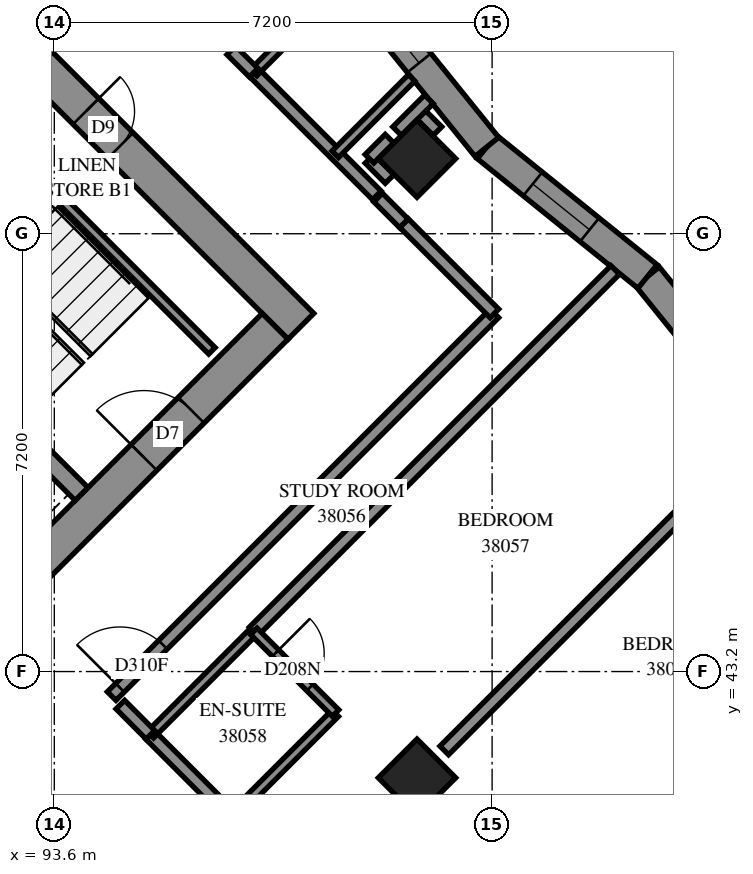
"""IFC4 building model, lengths in metres.
Left out: names, types, materials, properties, quantities, classifications, styles, units other than length and angle.
Written with IfcOpenShell. Run it as: python <this file> out.ifc"""

import sys

from ifc_helpers import new_model, si_unit, direction, frame, frame_2d, origin, origin_2d, place, context, subcontext, project, spatial, polyline, rectangle, outline, extrude, element, fill, save


model = new_model("IFC4")
c1 = context("Model", 3, precision=1e-05, world=origin(), true_north=direction((0.0, 1.0)))
c2 = subcontext(c1, "Body", "Model", "MODEL_VIEW")
j1 = project(units=[si_unit("LENGTHUNIT", "METRE"), si_unit("PLANEANGLEUNIT", "RADIAN")], contexts=[c1])
p1 = place(None, origin())
s1 = spatial("IfcSite", under=j1, at=p1, CompositionType="ELEMENT")
p2 = place(p1, origin())
s2 = spatial("IfcBuilding", under=s1, at=p2, CompositionType="ELEMENT")
p3 = place(p2, frame((0.0, 0.0, 142.2)))
s3 = spatial("IfcBuildingStorey", under=s2, at=p3, CompositionType="ELEMENT", Elevation=142.2)
for number, where, z_axis, x_axis in (
    (1, (99.565, 51.635, 0.0), (0.0, 0.0, 1.0), (0.707, -0.707, 0.0)),
    (2, (99.565, 41.453, 0.0), (0.0, 0.0, 1.0), (0.707, -0.707, 0.0)),
):
    element("IfcColumn", number, at=place(p3, frame(where, z_axis=z_axis, x_axis=x_axis)), inside=s3, PredefinedType="COLUMN", context=c2, shape_type="SweptSolid", body=[
        extrude(rectangle(XDim=0.9, YDim=0.9, at=origin_2d()), origin(), (0.0, 0.0, 1.0), 3.1),
    ])
p4 = place(p3, frame((86.625, 59.908, -0.3), z_axis=(0.0, 0.0, 1.0), x_axis=(0.7071067812, -0.7071067812, 0.0)))
e3 = element("IfcWall", 3, at=p4, inside=s3, PredefinedType="SHEAR", context=c2, shape_type="SweptSolid", body=[
    extrude(rectangle(XDim=15.6, YDim=0.6, at=frame_2d((7.8, 0.0))), origin(), (0.0, 0.0, 1.0), 2.7),
])
p5 = place(p4, frame((10.6, 0.0, 0.3)))
e4 = element("IfcOpeningElement", 4, at=p5, cuts=e3, PredefinedType="OPENING", context=c2, shape_type="SweptSolid", body=[
    extrude(rectangle(XDim=0.8, YDim=2.1, at=frame_2d((0.4, 1.05))), frame((0.0, 0.31, 0.0), z_axis=(0.0, -1.0, 0.0), x_axis=(1.0, 0.0, 0.0)), (0.0, 0.0, 1.0), 0.62),
])
p6 = place(p3, frame((87.049, 38.695, -0.3), z_axis=(0.0, 0.0, 1.0), x_axis=(0.7071067812, 0.7071067812, 0.0)))
e5 = element("IfcWall", 5, at=p6, inside=s3, PredefinedType="SHEAR", context=c2, shape_type="SweptSolid", body=[
    extrude(rectangle(XDim=14.4, YDim=0.6, at=frame_2d((7.2, 0.0))), origin(), (0.0, 0.0, 1.0), 2.7),
])
p7 = place(p6, frame((4.55, 0.0, 0.3)))
e6 = element("IfcOpeningElement", 6, at=p7, cuts=e5, PredefinedType="OPENING", context=c2, shape_type="SweptSolid", body=[
    extrude(rectangle(XDim=1.1, YDim=2.1, at=frame_2d((0.55, 1.05))), frame((0.0, 0.31, 0.0), z_axis=(0.0, -1.0, 0.0), x_axis=(1.0, 0.0, 0.0)), (0.0, 0.0, 1.0), 0.62),
])
p8 = place(p6, frame((11.35, 0.0, 0.3)))
e7 = element("IfcOpeningElement", 7, at=p8, cuts=e5, PredefinedType="OPENING", context=c2, shape_type="SweptSolid", body=[
    extrude(rectangle(XDim=1.1, YDim=2.1, at=frame_2d((0.55, 1.05))), frame((0.0, 0.31, 0.0), z_axis=(0.0, -1.0, 0.0), x_axis=(1.0, 0.0, 0.0)), (0.0, 0.0, 1.0), 0.62),
])
p9 = place(p3, frame((88.958, 51.211, 0.0), z_axis=(0.0, 0.0, 1.0), x_axis=(0.7070998367, -0.7071137256, 0.0)))
e8 = element("IfcWall", 8, at=p9, inside=s3, PredefinedType="SOLIDWALL", context=c2, shape_type="SweptSolid", body=[
    extrude(rectangle(XDim=7.2, YDim=0.3, at=frame_2d((3.6, 0.0))), origin(), (0.0, 0.0, 1.0), 3.1),
])
p10 = place(p3, frame((105.5, 47.038, 0.0), z_axis=(0.0, 0.0, 1.0), x_axis=(-0.6278674651, 0.7783202723, 0.0)))
e9 = element("IfcWall", 9, at=p10, inside=s3, PredefinedType="SOLIDWALL", context=c2, shape_type="SweptSolid", body=[
    extrude(outline(polyline([(0.049, -0.25), (3.442, -0.25), (3.389, 0.25), (-0.049, 0.25), (0.049, -0.25)])), origin(), (0.0, 0.0, 1.0), 3.1),
])
p11 = place(p10, frame((1.095, 0.0, 0.45)))
e10 = element("IfcOpeningElement", 10, at=p11, cuts=e9, PredefinedType="OPENING", context=c2, shape_type="SweptSolid", body=[
    extrude(rectangle(XDim=1.2, YDim=2.5, at=frame_2d((0.6, 1.25))), frame((0.0, 0.26, 0.0), z_axis=(0.0, -1.0, 0.0), x_axis=(1.0, 0.0, 0.0)), (0.0, 0.0, 1.0), 0.52),
])
p12 = place(p3, frame((103.355, 49.697, 0.0), z_axis=(0.0, 0.0, 1.0), x_axis=(-0.7783182818, 0.6278699325, 0.0)))
e11 = element("IfcWall", 11, at=p12, inside=s3, PredefinedType="SOLIDWALL", context=c2, shape_type="SweptSolid", body=[
    extrude(outline(polyline([(-0.027, -0.25), (3.367, -0.25), (3.421, 0.25), (0.027, 0.25), (-0.027, -0.25)])), origin(), (0.0, 0.0, 1.0), 3.1),
])
p13 = place(p12, frame((1.224, 0.0, 0.45)))
e12 = element("IfcOpeningElement", 12, at=p13, cuts=e11, PredefinedType="OPENING", context=c2, shape_type="SweptSolid", body=[
    extrude(rectangle(XDim=1.2, YDim=2.5, at=frame_2d((0.6, 1.25))), frame((0.0, 0.26, 0.0), z_axis=(0.0, -1.0, 0.0), x_axis=(1.0, 0.0, 0.0)), (0.0, 0.0, 1.0), 0.52),
])
p14 = place(p3, frame((100.714, 51.828, 0.0), z_axis=(0.0, 0.0, 1.0), x_axis=(-0.6278699325, 0.7783182818, 0.0)))
e13 = element("IfcWall", 13, at=p14, inside=s3, PredefinedType="SOLIDWALL", context=c2, shape_type="SweptSolid", body=[
    extrude(outline(polyline([(0.027, -0.25), (3.421, -0.25), (3.367, 0.25), (-0.027, 0.25), (0.027, -0.25)])), origin(), (0.0, 0.0, 1.0), 3.1),
])
p15 = place(p14, frame((1.774, 0.0, 0.45)))
e14 = element("IfcOpeningElement", 14, at=p15, cuts=e13, PredefinedType="OPENING", context=c2, shape_type="SweptSolid", body=[
    extrude(rectangle(XDim=1.2, YDim=2.5, at=frame_2d((0.6, 1.25))), frame((0.0, 0.26, 0.0), z_axis=(0.0, -1.0, 0.0), x_axis=(1.0, 0.0, 0.0)), (0.0, 0.0, 1.0), 0.52),
])
p16 = place(p3, frame((91.313, 53.354, 0.0), z_axis=(0.0, 0.0, 1.0), x_axis=(0.7071140275, -0.7070995348, 0.0)))
e15 = element("IfcWall", 15, at=p16, inside=s3, PredefinedType="PARTITIONING", context=c2, shape_type="SweptSolid", body=[
    extrude(rectangle(XDim=6.9, YDim=0.15, at=frame_2d((3.45, 0.0))), origin(), (0.0, 0.0, 1.0), 3.1),
])
p17 = place(p3, frame((93.127, 41.379, 0.0), z_axis=(0.0, 0.0, 1.0), x_axis=(0.7071067812, -0.7071067812, 0.0)))
e16 = element("IfcWall", 16, at=p17, inside=s3, PredefinedType="PARTITIONING", context=c2, shape_type="SweptSolid", body=[
    extrude(rectangle(XDim=9.39, YDim=0.2, at=frame_2d((4.695, 0.0))), origin(), (0.0, 0.0, 1.0), 3.1),
])
p18 = place(p17, frame((3.2, 0.0, 0.0)))
e17 = element("IfcOpeningElement", 17, at=p18, cuts=e16, PredefinedType="OPENING", context=c2, shape_type="SweptSolid", body=[
    extrude(rectangle(XDim=0.9, YDim=2.1, at=frame_2d((0.45, 1.05))), frame((0.0, 0.11, 0.0), z_axis=(0.0, -1.0, 0.0), x_axis=(1.0, 0.0, 0.0)), (0.0, 0.0, 1.0), 0.22),
])
p19 = place(p3, frame((94.543, 42.797, 0.0), z_axis=(0.0, 0.0, 1.0), x_axis=(0.7071067812, 0.7071067812, 0.0)))
e18 = element("IfcWall", 18, at=p19, inside=s3, PredefinedType="PARTITIONING", context=c2, shape_type="SweptSolid", body=[
    extrude(rectangle(XDim=8.901, YDim=0.2, at=frame_2d((4.45, 0.0))), origin(), (0.0, 0.0, 1.0), 3.1),
])
p20 = place(p19, frame((0.193, 0.0, 0.0)))
e19 = element("IfcOpeningElement", 19, at=p20, cuts=e18, PredefinedType="OPENING", context=c2, shape_type="SweptSolid", body=[
    extrude(rectangle(XDim=1.0, YDim=2.1, at=frame_2d((0.5, 1.05))), frame((0.0, 0.11, 0.0), z_axis=(0.0, -1.0, 0.0), x_axis=(1.0, 0.0, 0.0)), (0.0, 0.0, 1.0), 0.22),
])
p21 = place(p3, frame((95.177, 42.157, 0.0), z_axis=(0.0, 0.0, 1.0), x_axis=(0.7071067812, -0.7071067812, 0.0)))
e20 = element("IfcWall", 20, at=p21, inside=s3, PredefinedType="PARTITIONING", context=c2, shape_type="SweptSolid", body=[
    extrude(rectangle(XDim=8.491, YDim=0.2, at=frame_2d((4.245, 0.0))), origin(), (0.0, 0.0, 1.0), 3.1),
])
p22 = place(p21, frame((2.3, 0.0, 0.0)))
e21 = element("IfcOpeningElement", 21, at=p22, cuts=e20, PredefinedType="OPENING", context=c2, shape_type="SweptSolid", body=[
    extrude(rectangle(XDim=0.9, YDim=2.1, at=frame_2d((0.45, 1.05))), frame((0.0, 0.11, 0.0), z_axis=(0.0, -1.0, 0.0), x_axis=(1.0, 0.0, 0.0)), (0.0, 0.0, 1.0), 0.22),
])
p23 = place(p21, frame((3.95, 0.0, 0.0)))
e22 = element("IfcOpeningElement", 22, at=p23, cuts=e20, PredefinedType="OPENING", context=c2, shape_type="SweptSolid", body=[
    extrude(rectangle(XDim=0.9, YDim=2.1, at=frame_2d((0.45, 1.05))), frame((0.0, 0.11, 0.0), z_axis=(0.0, -1.0, 0.0), x_axis=(1.0, 0.0, 0.0)), (0.0, 0.0, 1.0), 0.22),
])
p24 = place(p3, frame((96.877, 43.859, 0.0), z_axis=(0.0, 0.0, 1.0), x_axis=(0.7071127272, 0.7071008351, 0.0)))
e23 = element("IfcWall", 23, at=p24, inside=s3, PredefinedType="PARTITIONING", context=c2, shape_type="SweptSolid", body=[
    extrude(rectangle(XDim=8.409, YDim=0.2, at=frame_2d((4.205, 0.0))), origin(), (0.0, 0.0, 1.0), 3.1),
])
p25 = place(p3, frame((100.013, 41.903, 0.0), z_axis=(0.0, 0.0, 1.0), x_axis=(0.7071067812, 0.7071067812, 0.0)))
e24 = element("IfcWall", 24, at=p25, inside=s3, PredefinedType="PARTITIONING", context=c2, shape_type="SweptSolid", body=[
    extrude(rectangle(XDim=5.928, YDim=0.2, at=frame_2d((2.964, 0.0))), origin(), (0.0, 0.0, 1.0), 3.1),
])
p26 = place(p3, frame((96.882, 53.053, 0.0), z_axis=(0.0, 0.0, 1.0), x_axis=(0.7071067812, -0.7071067812, 0.0)))
e25 = element("IfcWall", 25, at=p26, inside=s3, PredefinedType="PARTITIONING", context=c2, shape_type="SweptSolid", body=[
    extrude(rectangle(XDim=2.86, YDim=0.2, at=frame_2d((1.43, 0.0))), origin(), (0.0, 0.0, 1.0), 3.1),
])
for number, where, z_axis, x_axis in (
    (26, (96.523, 40.817, 0.0), (0.0, 0.0, 1.0), (0.707, 0.707, 0.0)),
    (27, (95.179, 42.161, 0.0), (0.0, 0.0, 1.0), (0.707, 0.707, 0.0)),
):
    element("IfcWall", number, at=place(p3, frame(where, z_axis=z_axis, x_axis=x_axis)), inside=s3, PredefinedType="PARTITIONING", context=c2, shape_type="SweptSolid", body=[
        extrude(rectangle(XDim=2.401, YDim=0.15, at=frame_2d((1.201, 0.0))), origin(), (0.0, 0.0, 1.0), 3.1),
    ])
p27 = place(p3, frame((99.352, 50.574, 0.0), z_axis=(0.0, 0.0, 1.0), x_axis=(0.7075827869, -0.7066304548, 0.0)))
e28 = element("IfcWall", 28, at=p27, inside=s3, PredefinedType="PARTITIONING", context=c2, shape_type="SweptSolid", body=[
    extrude(rectangle(XDim=2.1, YDim=0.2, at=frame_2d((1.05, 0.0))), origin(), (0.0, 0.0, 1.0), 3.1),
])
p28 = place(p3, frame((96.881, 43.861, 0.0), z_axis=(0.0, 0.0, 1.0), x_axis=(0.7071067812, -0.7071067812, 0.0)))
e29 = element("IfcWall", 29, at=p28, inside=s3, PredefinedType="PARTITIONING", context=c2, shape_type="SweptSolid", body=[
    extrude(rectangle(XDim=1.901, YDim=0.15, at=frame_2d((0.95, 0.0))), origin(), (0.0, 0.0, 1.0), 3.1),
])
p29 = place(p28, frame((0.505, 0.0, 0.0)))
e30 = element("IfcOpeningElement", 30, at=p29, cuts=e29, PredefinedType="OPENING", context=c2, shape_type="SweptSolid", body=[
    extrude(rectangle(XDim=0.8, YDim=2.1, at=frame_2d((0.4, 1.05))), frame((0.0, 0.085, 0.0), z_axis=(0.0, -1.0, 0.0), x_axis=(1.0, 0.0, 0.0)), (0.0, 0.0, 1.0), 0.17),
])
p30 = place(p3, frame((96.878, 53.05, 0.0), z_axis=(0.0, 0.0, 1.0), x_axis=(0.7076230681, 0.7065901171, 0.0)))
e31 = element("IfcWall", 31, at=p30, inside=s3, PredefinedType="PARTITIONING", context=c2, shape_type="SweptSolid", body=[
    extrude(rectangle(XDim=1.936, YDim=0.15, at=frame_2d((0.968, 0.0))), origin(), (0.0, 0.0, 1.0), 3.1),
])
p31 = place(p30, frame((0.834, 0.0, 0.0)))
e32 = element("IfcOpeningElement", 32, at=p31, cuts=e31, PredefinedType="OPENING", context=c2, shape_type="SweptSolid", body=[
    extrude(rectangle(XDim=0.8, YDim=2.1, at=frame_2d((0.4, 1.05))), frame((0.0, 0.085, 0.0), z_axis=(0.0, -1.0, 0.0), x_axis=(1.0, 0.0, 0.0)), (0.0, 0.0, 1.0), 0.17),
])
p32 = place(p3, frame((98.221, 51.707, 0.0), z_axis=(0.0, 0.0, 1.0), x_axis=(0.7071349331, 0.7070786281, 0.0)))
e33 = element("IfcWall", 33, at=p32, inside=s3, PredefinedType="PARTITIONING", context=c2, shape_type="SweptSolid", body=[
    extrude(rectangle(XDim=1.776, YDim=0.15, at=frame_2d((0.888, 0.0))), origin(), (0.0, 0.0, 1.0), 3.1),
])
p33 = place(p3, frame((94.686, 42.656, 0.0), z_axis=(0.0, 0.0, 1.0), x_axis=(0.7056768426, -0.7085338339, 0.0)))
e34 = element("IfcWall", 34, at=p33, inside=s3, PredefinedType="PARTITIONING", context=c2, shape_type="SweptSolid", body=[
    extrude(rectangle(XDim=0.7, YDim=0.2, at=frame_2d((0.35, 0.0))), origin(), (0.0, 0.0, 1.0), 3.1),
])
p34 = place(p3, frame((98.925, 50.995, 0.0), z_axis=(0.0, 0.0, 1.0), x_axis=(0.7071067812, -0.7071067812, 0.0)))
e35 = element("IfcWall", 35, at=p34, inside=s3, PredefinedType="PARTITIONING", context=c2, shape_type="SweptSolid", body=[
    extrude(rectangle(XDim=0.6, YDim=0.2, at=frame_2d((0.3, 0.0))), origin(), (0.0, 0.0, 1.0), 3.1),
])
p35 = place(p3, frame((96.51, 53.416, 0.0), z_axis=(0.0, 0.0, 1.0), x_axis=(0.7090308706, -0.7051774419, 0.0)))
e36 = element("IfcWall", 36, at=p35, inside=s3, PredefinedType="PARTITIONING", context=c2, shape_type="SweptSolid", body=[
    extrude(rectangle(XDim=0.519, YDim=0.2, at=frame_2d((0.26, 0.0))), origin(), (0.0, 0.0, 1.0), 3.1),
])
for number, where, z_axis, x_axis in (
    (37, (99.57, 52.418, 0.0), (0.0, 0.0, 1.0), (0.709, -0.705, 0.0)),
    (38, (98.784, 51.632, 0.0), (0.0, 0.0, 1.0), (0.705, -0.709, 0.0)),
):
    element("IfcWall", number, at=place(p3, frame(where, z_axis=z_axis, x_axis=x_axis)), inside=s3, PredefinedType="PARTITIONING", context=c2, shape_type="SweptSolid", body=[
        extrude(rectangle(XDim=0.468, YDim=0.2, at=frame_2d((0.234, 0.0))), origin(), (0.0, 0.0, 1.0), 3.1),
    ])
p36 = place(p3, frame((98.783, 51.633, 0.0), z_axis=(0.0, 0.0, 1.0), x_axis=(0.7071067812, 0.7071067812, 0.0)))
e39 = element("IfcWall", 39, at=p36, inside=s3, PredefinedType="PARTITIONING", context=c2, shape_type="SweptSolid", body=[
    extrude(rectangle(XDim=0.467, YDim=0.2, at=frame_2d((0.233, 0.0))), origin(), (0.0, 0.0, 1.0), 3.1),
])
p37 = place(p3, frame((99.237, 52.087, 0.0), z_axis=(0.0, 0.0, 1.0), x_axis=(0.7071742693, 0.7070392866, 0.0)))
e40 = element("IfcWall", 40, at=p37, inside=s3, PredefinedType="PARTITIONING", context=c2, shape_type="SweptSolid", body=[
    extrude(rectangle(XDim=0.741, YDim=0.2, at=frame_2d((0.37, 0.0))), origin(), (0.0, 0.0, 1.0), 3.1),
])
p38 = place(p13, origin())
e41 = element("IfcWindow", 41, at=p38, inside=s3, PartitioningType="SINGLE_PANEL", PredefinedType="WINDOW", context=c2, shape_type="SweptSolid", body=[
    extrude(rectangle(XDim=1.2, YDim=2.5, at=frame_2d((0.6, 1.25))), frame((0.0, 0.18, 0.0), z_axis=(0.0, -1.0, 0.0), x_axis=(1.0, 0.0, 0.0)), (0.0, 0.0, 1.0), 0.06),
])
fill(e12, e41)
p39 = place(p15, origin())
e42 = element("IfcWindow", 42, at=p39, inside=s3, PartitioningType="SINGLE_PANEL", PredefinedType="WINDOW", context=c2, shape_type="SweptSolid", body=[
    extrude(rectangle(XDim=1.2, YDim=2.5, at=frame_2d((0.6, 1.25))), frame((0.0, 0.18, 0.0), z_axis=(0.0, -1.0, 0.0), x_axis=(1.0, 0.0, 0.0)), (0.0, 0.0, 1.0), 0.06),
])
fill(e14, e42)
p40 = place(p5, origin())
e43 = element("IfcDoor", 43, at=p40, inside=s3, OperationType="SINGLE_SWING_RIGHT", PredefinedType="DOOR", context=c2, shape_type="SweptSolid", body=[
    extrude(rectangle(XDim=0.8, YDim=2.1, at=frame_2d((0.4, 1.05))), frame((0.0, 0.025, 0.0), z_axis=(0.0, -1.0, 0.0), x_axis=(1.0, 0.0, 0.0)), (0.0, 0.0, 1.0), 0.05),
])
fill(e4, e43)
p41 = place(p8, origin())
e44 = element("IfcDoor", 44, at=p41, inside=s3, OperationType="SINGLE_SWING_RIGHT", PredefinedType="DOOR", context=c2, shape_type="SweptSolid", body=[
    extrude(rectangle(XDim=1.1, YDim=2.1, at=frame_2d((0.55, 1.05))), frame((0.0, 0.025, 0.0), z_axis=(0.0, -1.0, 0.0), x_axis=(1.0, 0.0, 0.0)), (0.0, 0.0, 1.0), 0.05),
])
fill(e7, e44)
p42 = place(p20, origin())
e45 = element("IfcDoor", 45, at=p42, inside=s3, OperationType="SINGLE_SWING_LEFT", PredefinedType="DOOR", context=c2, shape_type="SweptSolid", body=[
    extrude(rectangle(XDim=1.0, YDim=2.1, at=frame_2d((0.5, 1.05))), frame((0.0, 0.025, 0.0), z_axis=(0.0, -1.0, 0.0), x_axis=(1.0, 0.0, 0.0)), (0.0, 0.0, 1.0), 0.05),
])
fill(e19, e45)
p43 = place(p29, origin())
e46 = element("IfcDoor", 46, at=p43, inside=s3, OperationType="SINGLE_SWING_RIGHT", PredefinedType="DOOR", context=c2, shape_type="SweptSolid", body=[
    extrude(rectangle(XDim=0.8, YDim=2.1, at=frame_2d((0.4, 1.05))), frame((0.0, 0.025, 0.0), z_axis=(0.0, -1.0, 0.0), x_axis=(1.0, 0.0, 0.0)), (0.0, 0.0, 1.0), 0.05),
])
fill(e30, e46)
save(model, sys.argv[1])
